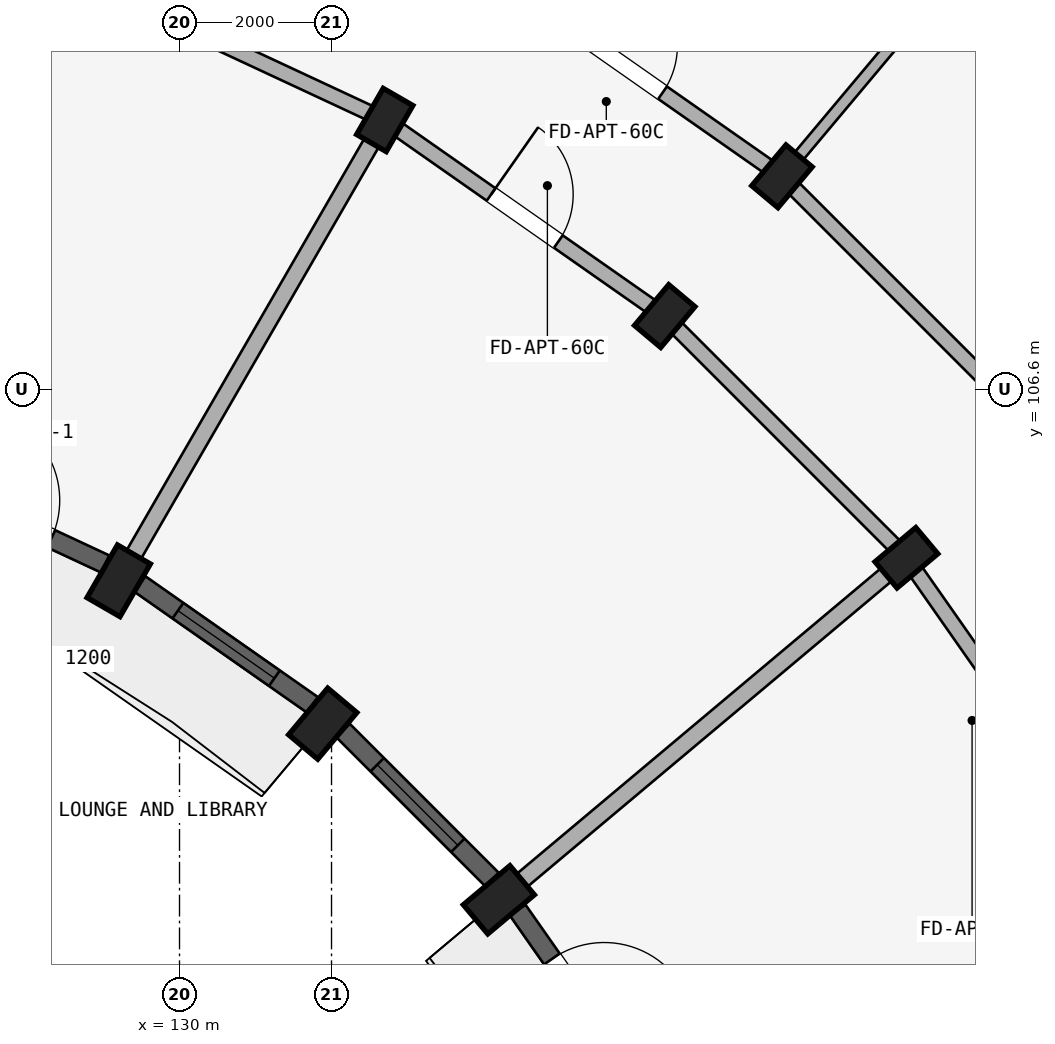
"""IFC4 building model, lengths in metres.
Left out: names, types, materials, properties, quantities, classifications, styles, units other than length and angle.
Written with IfcOpenShell. Run it as: python <this file> out.ifc"""

import sys

from ifc_helpers import new_model, si_unit, direction, frame, frame_2d, origin, origin_2d, place, context, subcontext, project, spatial, rectangle, extrude, element, fill, save


model = new_model("IFC4")
c1 = context("Model", 3, precision=1e-05, world=origin(), true_north=direction((0.0, 1.0)))
c2 = subcontext(c1, "Body", "Model", "MODEL_VIEW")
j1 = project(units=[si_unit("LENGTHUNIT", "METRE"), si_unit("PLANEANGLEUNIT", "RADIAN")], contexts=[c1])
p1 = place(None, origin())
s1 = spatial("IfcSite", under=j1, at=p1, CompositionType="ELEMENT")
p2 = place(p1, origin())
s2 = spatial("IfcBuilding", under=s1, at=p2, CompositionType="ELEMENT")
p3 = place(p2, frame((0.0, 0.0, 21.3)))
s3 = spatial("IfcBuildingStorey", under=s2, at=p3, CompositionType="ELEMENT", Elevation=21.3)
p4 = place(p3, frame((129.2, 104.081, 0.0), z_axis=(0.0, 0.0, 1.0), x_axis=(-0.866025403784, 0.5, 0.0)))
e1 = element("IfcColumn", 1, at=p4, inside=s3, PredefinedType="COLUMN", context=c2, shape_type="SweptSolid", body=[
    extrude(rectangle(XDim=0.5, YDim=0.8, at=origin_2d()), origin(), (0.0, 0.0, 1.0), 2.93),
])
p5 = place(p3, frame((132.7, 110.144, 0.0), z_axis=(0.0, 0.0, 1.0), x_axis=(-0.866025403784, 0.5, 0.0)))
e2 = element("IfcColumn", 2, at=p5, inside=s3, PredefinedType="COLUMN", context=c2, shape_type="SweptSolid", body=[
    extrude(rectangle(XDim=0.45, YDim=0.7, at=origin_2d()), origin(), (0.0, 0.0, 1.0), 2.93),
])
p6 = place(p3, frame((131.885, 102.202, 0.0), z_axis=(0.0, 0.0, 1.0), x_axis=(-0.766044443119, 0.642787609687, 0.0)))
e3 = element("IfcColumn", 3, at=p6, inside=s3, PredefinedType="COLUMN", context=c2, shape_type="SweptSolid", body=[
    extrude(rectangle(XDim=0.5, YDim=0.8, at=origin_2d()), origin(), (0.0, 0.0, 1.0), 2.93),
])
for number, where, z_axis, x_axis in (
    (4, (136.384, 107.564, 0.0), (0.0, 0.0, 1.0), (-0.766, 0.643, 0.0)),
    (5, (137.927, 109.402, 0.0), (0.0, 0.0, 1.0), (-0.766, 0.643, 0.0)),
):
    element("IfcColumn", number, at=place(p3, frame(where, z_axis=z_axis, x_axis=x_axis)), inside=s3, PredefinedType="COLUMN", context=c2, shape_type="SweptSolid", body=[
        extrude(rectangle(XDim=0.45, YDim=0.7, at=origin_2d()), origin(), (0.0, 0.0, 1.0), 2.93),
    ])
p7 = place(p3, frame((134.202, 99.885, 0.0), z_axis=(0.0, 0.0, 1.0), x_axis=(-0.642787609687, 0.766044443119, 0.0)))
e6 = element("IfcColumn", 6, at=p7, inside=s3, PredefinedType="COLUMN", context=c2, shape_type="SweptSolid", body=[
    extrude(rectangle(XDim=0.5, YDim=0.8, at=origin_2d()), origin(), (0.0, 0.0, 1.0), 2.93),
])
p8 = place(p3, frame((139.564, 104.384, 0.0), z_axis=(0.0, 0.0, 1.0), x_axis=(-0.642787609687, 0.766044443119, 0.0)))
e7 = element("IfcColumn", 7, at=p8, inside=s3, PredefinedType="COLUMN", context=c2, shape_type="SweptSolid", body=[
    extrude(rectangle(XDim=0.45, YDim=0.7, at=origin_2d()), origin(), (0.0, 0.0, 1.0), 2.93),
])
p9 = place(p3, frame((128.624, 112.044, 0.0), z_axis=(0.0, 0.0, 1.0), x_axis=(0.906307919131, -0.422617978463, 0.0)))
e8 = element("IfcWall", 8, at=p9, inside=s3, PredefinedType="STANDARD", context=c2, shape_type="SweptSolid", body=[
    extrude(rectangle(XDim=4.497, YDim=0.2, at=frame_2d((2.249, 0.0))), origin(), (0.0, 0.0, 1.0), 2.372),
])
p10 = place(p3, frame((132.7, 110.144, 0.0), z_axis=(0.0, 0.0, 1.0), x_axis=(0.819155404658, -0.573571637217, 0.0)))
e9 = element("IfcWall", 9, at=p10, inside=s3, PredefinedType="STANDARD", context=c2, shape_type="SweptSolid", body=[
    extrude(rectangle(XDim=4.497, YDim=0.2, at=frame_2d((2.249, 0.0))), origin(), (0.0, 0.0, 1.0), 2.372),
])
p11 = place(p10, frame((1.709, 0.0, 0.0)))
e10 = element("IfcOpeningElement", 10, at=p11, cuts=e9, PredefinedType="OPENING", context=c2, shape_type="SweptSolid", body=[
    extrude(rectangle(XDim=1.08, YDim=2.15, at=frame_2d((0.54, 1.075))), frame((0.0, 0.11, 0.0), z_axis=(0.0, -1.0, 0.0), x_axis=(1.0, 0.0, 0.0)), (0.0, 0.0, 1.0), 0.22),
])
p12 = place(p3, frame((133.9, 112.222, 0.0), z_axis=(0.0, 0.0, 1.0), x_axis=(0.819140911474, -0.573592335331, 0.0)))
e11 = element("IfcWall", 11, at=p12, inside=s3, PredefinedType="STANDARD", context=c2, shape_type="SweptSolid", body=[
    extrude(rectangle(XDim=4.916, YDim=0.2, at=frame_2d((2.458, 0.0))), origin(), (0.0, 0.0, 1.0), 2.372),
])
p13 = place(p12, frame((1.918, 0.0, 0.0)))
e12 = element("IfcOpeningElement", 12, at=p13, cuts=e11, PredefinedType="OPENING", context=c2, shape_type="SweptSolid", body=[
    extrude(rectangle(XDim=1.08, YDim=2.15, at=frame_2d((0.54, 1.075))), frame((0.0, 0.11, 0.0), z_axis=(0.0, -1.0, 0.0), x_axis=(1.0, 0.0, 0.0)), (0.0, 0.0, 1.0), 0.22),
])
p14 = place(p3, frame((136.384, 107.564, 0.0), z_axis=(0.0, 0.0, 1.0), x_axis=(0.707106781187, -0.707106781187, 0.0)))
e13 = element("IfcWall", 13, at=p14, inside=s3, PredefinedType="STANDARD", context=c2, shape_type="SweptSolid", body=[
    extrude(rectangle(XDim=4.497, YDim=0.2, at=frame_2d((2.249, 0.0))), origin(), (0.0, 0.0, 1.0), 2.372),
])
p15 = place(p3, frame((137.927, 109.402, 0.0), z_axis=(0.0, 0.0, 1.0), x_axis=(0.707106781187, -0.707106781187, 0.0)))
e14 = element("IfcWall", 14, at=p15, inside=s3, PredefinedType="STANDARD", context=c2, shape_type="SweptSolid", body=[
    extrude(rectangle(XDim=4.916, YDim=0.2, at=frame_2d((2.458, 0.0))), origin(), (0.0, 0.0, 1.0), 2.372),
])
p16 = place(p3, frame((139.564, 104.384, 0.0), z_axis=(0.0, 0.0, 1.0), x_axis=(0.573571637217, -0.819155404658, 0.0)))
e15 = element("IfcWall", 15, at=p16, inside=s3, PredefinedType="STANDARD", context=c2, shape_type="SweptSolid", body=[
    extrude(rectangle(XDim=4.497, YDim=0.2, at=frame_2d((2.249, 0.0))), origin(), (0.0, 0.0, 1.0), 2.372),
])
p17 = place(p16, frame((1.749, 0.0, 0.0)))
e16 = element("IfcOpeningElement", 16, at=p17, cuts=e15, PredefinedType="OPENING", context=c2, shape_type="SweptSolid", body=[
    extrude(rectangle(XDim=1.0, YDim=2.15, at=frame_2d((0.5, 1.075))), frame((0.0, 0.11, 0.0), z_axis=(0.0, -1.0, 0.0), x_axis=(1.0, 0.0, 0.0)), (0.0, 0.0, 1.0), 0.22),
])
p18 = place(p3, frame((129.3, 104.254, 0.0), z_axis=(0.0, 0.0, 1.0), x_axis=(0.499997969693, 0.866026575979, 0.0)))
e17 = element("IfcWall", 17, at=p18, inside=s3, PredefinedType="STANDARD", context=c2, shape_type="SweptSolid", body=[
    extrude(rectangle(XDim=6.75, YDim=0.22, at=frame_2d((3.375, 0.0))), origin(), (0.0, 0.0, 1.0), 2.372),
])
p19 = place(p3, frame((137.991, 109.479, 0.0), z_axis=(0.0, 0.0, 1.0), x_axis=(0.642784757967, 0.766046835987, 0.0)))
e18 = element("IfcWall", 18, at=p19, inside=s3, PredefinedType="PARTITIONING", context=c2, shape_type="SweptSolid", body=[
    extrude(rectangle(XDim=17.42, YDim=0.15, at=frame_2d((8.71, 0.0))), origin(), (0.0, 0.0, 1.0), 2.372),
])
p20 = place(p19, frame((4.45, 0.0, 0.0)))
e19 = element("IfcOpeningElement", 19, at=p20, cuts=e18, PredefinedType="OPENING", context=c2, shape_type="SweptSolid", body=[
    extrude(rectangle(XDim=0.8, YDim=2.1, at=frame_2d((0.4, 1.05))), frame((0.0, 0.085, 0.0), z_axis=(0.0, -1.0, 0.0), x_axis=(1.0, 0.0, 0.0)), (0.0, 0.0, 1.0), 0.17),
])
p21 = place(p3, frame((134.355, 100.013, 0.0), z_axis=(0.0, 0.0, 1.0), x_axis=(0.766046761698, 0.642784846501, 0.0)))
e20 = element("IfcWall", 20, at=p21, inside=s3, PredefinedType="STANDARD", context=c2, shape_type="SweptSolid", body=[
    extrude(rectangle(XDim=6.75, YDim=0.22, at=frame_2d((3.375, 0.0))), origin(), (0.0, 0.0, 1.0), 2.372),
])
p22 = place(p3, frame((126.513, 105.472, 0.0), z_axis=(0.0, 0.0, 1.0), x_axis=(0.906293449611, -0.422649007088, 0.0)))
e21 = element("IfcWall", 21, at=p22, inside=s3, PredefinedType="STANDARD", context=c2, shape_type="SweptSolid", body=[
    extrude(rectangle(XDim=2.77, YDim=0.25, at=frame_2d((1.385, 0.0))), origin(), (0.0, 0.0, 1.0), 2.472),
])
p23 = place(p22, frame((0.785, 0.0, 0.0)))
e22 = element("IfcOpeningElement", 22, at=p23, cuts=e21, PredefinedType="OPENING", context=c2, shape_type="SweptSolid", body=[
    extrude(rectangle(XDim=1.2, YDim=2.15, at=frame_2d((0.6, 1.075))), frame((0.0, 0.135, 0.0), z_axis=(0.0, -1.0, 0.0), x_axis=(1.0, 0.0, 0.0)), (0.0, 0.0, 1.0), 0.27),
])
p24 = place(p3, frame((129.479, 104.038, 0.0), z_axis=(0.0, 0.0, 1.0), x_axis=(0.819111815273, -0.573633885053, 0.0)))
e23 = element("IfcWall", 23, at=p24, inside=s3, PredefinedType="STANDARD", context=c2, shape_type="SweptSolid", body=[
    extrude(rectangle(XDim=2.77, YDim=0.25, at=frame_2d((1.385, 0.0))), origin(), (0.0, 0.0, 1.0), 2.472),
])
p25 = place(p24, frame((0.61, 0.0, 0.672)))
e24 = element("IfcOpeningElement", 24, at=p25, cuts=e23, PredefinedType="OPENING", context=c2, shape_type="SweptSolid", body=[
    extrude(rectangle(XDim=1.55, YDim=1.6, at=frame_2d((0.775, 0.8))), frame((0.0, 0.135, 0.0), z_axis=(0.0, -1.0, 0.0), x_axis=(1.0, 0.0, 0.0)), (0.0, 0.0, 1.0), 0.27),
])
p26 = place(p3, frame((132.152, 102.111, 0.0), z_axis=(0.0, 0.0, 1.0), x_axis=(0.707106781187, -0.707106781187, 0.0)))
e25 = element("IfcWall", 25, at=p26, inside=s3, PredefinedType="STANDARD", context=c2, shape_type="SweptSolid", body=[
    extrude(rectangle(XDim=2.77, YDim=0.25, at=frame_2d((1.385, 0.0))), origin(), (0.0, 0.0, 1.0), 2.472),
])
p27 = place(p26, frame((0.635, 0.0, 0.622)))
e26 = element("IfcOpeningElement", 26, at=p27, cuts=e25, PredefinedType="OPENING", context=c2, shape_type="SweptSolid", body=[
    extrude(rectangle(XDim=1.5, YDim=1.65, at=frame_2d((0.75, 0.825))), frame((0.0, 0.135, 0.0), z_axis=(0.0, -1.0, 0.0), x_axis=(1.0, 0.0, 0.0)), (0.0, 0.0, 1.0), 0.27),
])
p28 = place(p3, frame((134.449, 99.748, 0.0), z_axis=(0.0, 0.0, 1.0), x_axis=(0.573633885053, -0.819111815273, 0.0)))
e27 = element("IfcWall", 27, at=p28, inside=s3, PredefinedType="STANDARD", context=c2, shape_type="SweptSolid", body=[
    extrude(rectangle(XDim=2.77, YDim=0.25, at=frame_2d((1.385, 0.0))), origin(), (0.0, 0.0, 1.0), 2.472),
])
p29 = place(p28, frame((0.785, 0.0, 0.0)))
e28 = element("IfcOpeningElement", 28, at=p29, cuts=e27, PredefinedType="OPENING", context=c2, shape_type="SweptSolid", body=[
    extrude(rectangle(XDim=1.2, YDim=2.15, at=frame_2d((0.6, 1.075))), frame((0.0, 0.135, 0.0), z_axis=(0.0, -1.0, 0.0), x_axis=(1.0, 0.0, 0.0)), (0.0, 0.0, 1.0), 0.27),
])
p30 = place(p25, origin())
e29 = element("IfcWindow", 29, at=p30, inside=s3, PartitioningType="DOUBLE_PANEL_VERTICAL", PredefinedType="WINDOW", context=c2, shape_type="SweptSolid", body=[
    extrude(rectangle(XDim=1.55, YDim=1.6, at=frame_2d((0.775, 0.8))), frame((0.0, 0.03, 0.0), z_axis=(0.0, -1.0, 0.0), x_axis=(1.0, 0.0, 0.0)), (0.0, 0.0, 1.0), 0.06),
])
fill(e24, e29)
p31 = place(p27, origin())
e30 = element("IfcWindow", 30, at=p31, inside=s3, PartitioningType="DOUBLE_PANEL_VERTICAL", PredefinedType="WINDOW", context=c2, shape_type="SweptSolid", body=[
    extrude(rectangle(XDim=1.5, YDim=1.65, at=frame_2d((0.75, 0.825))), frame((0.0, 0.03, 0.0), z_axis=(0.0, -1.0, 0.0), x_axis=(1.0, 0.0, 0.0)), (0.0, 0.0, 1.0), 0.06),
])
fill(e26, e30)
p32 = place(p13, origin())
e31 = element("IfcDoor", 31, at=p32, inside=s3, OperationType="SINGLE_SWING_LEFT", PredefinedType="DOOR", context=c2, shape_type="SweptSolid", body=[
    extrude(rectangle(XDim=1.08, YDim=2.15, at=frame_2d((0.54, 1.075))), frame((0.0, 0.025, 0.0), z_axis=(0.0, -1.0, 0.0), x_axis=(1.0, 0.0, 0.0)), (0.0, 0.0, 1.0), 0.05),
])
fill(e12, e31)
p33 = place(p11, frame((1.08, 0.0, 0.0), z_axis=(0.0, 0.0, 1.0), x_axis=(-1.0, 0.0, 0.0)))
e32 = element("IfcDoor", 32, at=p33, inside=s3, OperationType="SINGLE_SWING_RIGHT", PredefinedType="DOOR", context=c2, shape_type="SweptSolid", body=[
    extrude(rectangle(XDim=1.08, YDim=2.15, at=frame_2d((0.54, 1.075))), frame((0.0, 0.025, 0.0), z_axis=(0.0, -1.0, 0.0), x_axis=(1.0, 0.0, 0.0)), (0.0, 0.0, 1.0), 0.05),
])
fill(e10, e32)
p34 = place(p29, frame((1.2, 0.0, 0.0), z_axis=(0.0, 0.0, 1.0), x_axis=(-1.0, 0.0, 0.0)))
e33 = element("IfcDoor", 33, at=p34, inside=s3, OperationType="SINGLE_SWING_LEFT", PredefinedType="DOOR", context=c2, shape_type="SweptSolid", body=[
    extrude(rectangle(XDim=1.2, YDim=2.15, at=frame_2d((0.6, 1.075))), frame((0.0, 0.025, 0.0), z_axis=(0.0, -1.0, 0.0), x_axis=(1.0, 0.0, 0.0)), (0.0, 0.0, 1.0), 0.05),
])
fill(e28, e33)
save(model, sys.argv[1])
